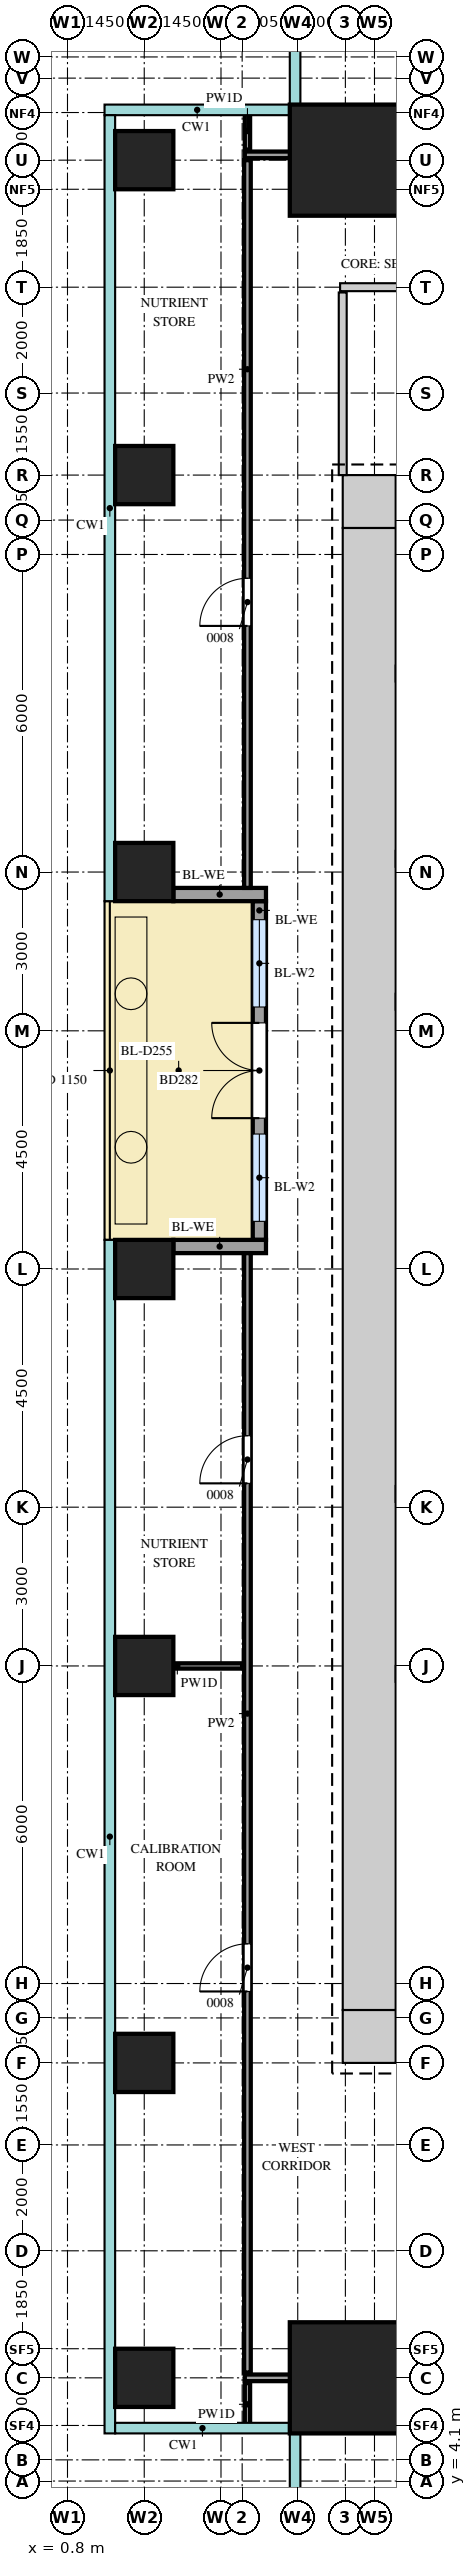
"""IFC4 building model, lengths in metres.
Left out: names, types, materials, properties, quantities, classifications, styles, units other than length and angle.
Written with IfcOpenShell. Run it as: python <this file> out.ifc"""

import sys

from ifc_helpers import new_model, si_unit, direction, frame, frame_2d, origin, origin_2d, place, context, subcontext, project, spatial, rectangle, extrude, source, transform, mapped, element, fill, save


model = new_model("IFC4")
c1 = context("Model", 3, precision=1e-05, world=origin(), true_north=direction((0.0, 1.0)))
c2 = subcontext(c1, "Body", "Model", "MODEL_VIEW")
j1 = project(units=[si_unit("LENGTHUNIT", "METRE"), si_unit("PLANEANGLEUNIT", "RADIAN")], contexts=[c1])
p1 = place(None, origin())
s1 = spatial("IfcSite", under=j1, at=p1, CompositionType="ELEMENT")
p2 = place(p1, origin())
s2 = spatial("IfcBuilding", under=s1, at=p2, CompositionType="ELEMENT")
p3 = place(p2, frame((0.0, 0.0, 132.3)))
s3 = spatial("IfcBuildingStorey", under=s2, at=p3, CompositionType="ELEMENT", Elevation=132.3)
m1 = source(origin(), c2, "Body", "SweptSolid", [
    extrude(rectangle(XDim=1.0, YDim=1.0, at=frame_2d((0.5, 0.0))), origin(), (0.0, 0.0, 1.0), 4.1),
])
for number, where, z_axis, x_axis in (
    (1, (6.0, 41.5, 0.0), (0.0, 0.0, 1.0), (1.0, 0.0, 0.0)),
    (2, (6.0, 12.5, 0.0), (0.0, 0.0, 1.0), (1.0, 0.0, 0.0)),
):
    element("IfcWall", number, at=place(p3, frame(where, z_axis=z_axis, x_axis=x_axis)), inside=s3, PredefinedType="SHEAR", context=c2, shape_type="MappedRepresentation", body=[
        mapped(m1, transform((0.0, 0.0, 0.0))),
    ])
m2 = source(origin(), c2, "Body", "SweptSolid", [
    extrude(rectangle(XDim=28.0, YDim=1.0, at=frame_2d((14.0, 0.0))), origin(), (0.0, 0.0, 1.0), 4.1),
])
p4 = place(p3, frame((6.5, 13.0, 0.0), z_axis=(0.0, 0.0, 1.0), x_axis=(0.0, 1.0, 0.0)))
e3 = element("IfcWall", 3, at=p4, inside=s3, PredefinedType="SHEAR", context=c2, shape_type="MappedRepresentation", body=[
    mapped(m2, transform((0.0, 0.0, 0.0))),
])
m3 = source(origin(), c2, "Body", "SweptSolid", [
    extrude(rectangle(XDim=2.1, YDim=2.1, at=origin_2d()), origin(), (0.0, 0.0, 1.0), 4.4),
])
for number, where, z_axis, x_axis in (
    (4, (6.05, 47.95, 0.0), (0.0, 0.0, 1.0), (1.0, 0.0, 0.0)),
    (5, (6.05, 6.05, 0.0), (0.0, 0.0, 1.0), (1.0, 0.0, 0.0)),
):
    element("IfcColumn", number, at=place(p3, frame(where, z_axis=z_axis, x_axis=x_axis)), inside=s3, PredefinedType="COLUMN", context=c2, shape_type="MappedRepresentation", body=[
        mapped(m3, transform((0.0, 0.0, 0.0))),
    ])
m4 = source(origin(), c2, "Body", "SweptSolid", [
    extrude(rectangle(XDim=1.1, YDim=1.1, at=origin_2d()), origin(), (0.0, 0.0, 1.0), 4.1),
])
for number, where, z_axis, x_axis in (
    (6, (2.25, 6.05, 0.0), (0.0, 0.0, 1.0), (1.0, 0.0, 0.0)),
    (7, (2.25, 12.0, 0.0), (0.0, 0.0, 1.0), (1.0, 0.0, 0.0)),
    (8, (2.25, 19.5, 0.0), (0.0, 0.0, 1.0), (1.0, 0.0, 0.0)),
    (9, (2.25, 27.0, 0.0), (0.0, 0.0, 1.0), (1.0, 0.0, 0.0)),
    (10, (2.25, 34.5, 0.0), (0.0, 0.0, 1.0), (1.0, 0.0, 0.0)),
    (11, (2.25, 42.0, 0.0), (0.0, 0.0, 1.0), (1.0, 0.0, 0.0)),
    (12, (2.25, 47.95, 0.0), (0.0, 0.0, 1.0), (1.0, 0.0, 0.0)),
):
    element("IfcColumn", number, at=place(p3, frame(where, z_axis=z_axis, x_axis=x_axis)), inside=s3, PredefinedType="COLUMN", context=c2, shape_type="MappedRepresentation", body=[
        mapped(m4, transform((0.0, 0.0, 0.0))),
    ])
m5 = source(origin(), c2, "Body", "SweptSolid", [
    extrude(rectangle(XDim=6.4, YDim=0.25, at=frame_2d((3.2, 0.0))), origin(), (0.0, 0.0, 1.0), 3.5),
])
p5 = place(p3, frame((4.425, 27.55, 0.0), z_axis=(0.0, 0.0, 1.0), x_axis=(0.0, 1.0, 0.0)))
e13 = element("IfcWall", 13, at=p5, inside=s3, PredefinedType="SOLIDWALL", context=c2, shape_type="MappedRepresentation", body=[
    mapped(m5, transform((0.0, 0.0, 0.0))),
])
m6 = source(origin(), c2, "Body", "SweptSolid", [
    extrude(rectangle(XDim=1.65, YDim=2.4, at=frame_2d((0.825, 1.2))), frame((0.0, 0.135, 0.0), z_axis=(0.0, -1.0, 0.0), x_axis=(1.0, 0.0, 0.0)), (0.0, 0.0, 1.0), 0.27),
])
p6 = place(p5, frame((0.35, 0.0, 0.0)))
e14 = element("IfcOpeningElement", 14, at=p6, cuts=e13, PredefinedType="OPENING", context=c2, shape_type="MappedRepresentation", body=[
    mapped(m6, transform((0.0, 0.0, 0.0))),
])
p7 = place(p5, frame((4.4, 0.0, 0.0)))
e15 = element("IfcOpeningElement", 15, at=p7, cuts=e13, PredefinedType="OPENING", context=c2, shape_type="MappedRepresentation", body=[
    mapped(m6, transform((0.0, 0.0, 0.0))),
])
m7 = source(origin(), c2, "Body", "SweptSolid", [
    extrude(rectangle(XDim=1.8, YDim=2.4, at=frame_2d((0.9, 1.2))), frame((0.0, 0.135, 0.0), z_axis=(0.0, -1.0, 0.0), x_axis=(1.0, 0.0, 0.0)), (0.0, 0.0, 1.0), 0.27),
])
p8 = place(p5, frame((2.3, 0.0, 0.0)))
e16 = element("IfcOpeningElement", 16, at=p8, cuts=e13, PredefinedType="OPENING", context=c2, shape_type="MappedRepresentation", body=[
    mapped(m7, transform((0.0, 0.0, 0.0))),
])
m8 = source(origin(), c2, "Body", "SweptSolid", [
    extrude(rectangle(XDim=1.75, YDim=0.25, at=frame_2d((0.875, 0.0))), origin(), (0.0, 0.0, 1.0), 3.5),
])
for number, where, z_axis, x_axis in (
    (17, (2.8, 27.425, 0.0), (0.0, 0.0, 1.0), (1.0, 0.0, 0.0)),
    (18, (2.8, 34.075, 0.0), (0.0, 0.0, 1.0), (1.0, 0.0, 0.0)),
):
    element("IfcWall", number, at=place(p3, frame(where, z_axis=z_axis, x_axis=x_axis)), inside=s3, PredefinedType="SOLIDWALL", context=c2, shape_type="MappedRepresentation", body=[
        mapped(m8, transform((0.0, 0.0, 0.0))),
    ])
m9 = source(origin(), c2, "Body", "SweptSolid", [
    extrude(rectangle(XDim=0.8, YDim=0.1, at=frame_2d((0.4, 0.0))), origin(), (0.0, 0.0, 1.0), 4.2),
])
p9 = place(p3, frame((4.2, 5.15, 0.0), z_axis=(0.0, 0.0, 1.0), x_axis=(0.0, 1.0, 0.0)))
e19 = element("IfcWall", 19, at=p9, inside=s3, PredefinedType="PARTITIONING", context=c2, shape_type="MappedRepresentation", body=[
    mapped(m9, transform((0.0, 0.0, 0.0))),
])
m10 = source(origin(), c2, "Body", "SweptSolid", [
    extrude(rectangle(XDim=22.3, YDim=0.125, at=frame_2d((11.15, 0.0))), origin(), (0.0, 0.0, 1.0), 3.55),
])
p10 = place(p3, frame((4.15, 6.05, 0.0), z_axis=(0.0, 0.0, 1.0), x_axis=(1.0, 0.0, 0.0)))
e20 = element("IfcWall", 20, at=p10, inside=s3, PredefinedType="PARTITIONING", context=c2, shape_type="MappedRepresentation", body=[
    mapped(m10, transform((0.0, 0.0, 0.0))),
])
m11 = source(origin(), c2, "Body", "SweptSolid", [
    extrude(rectangle(XDim=0.9, YDim=2.1, at=frame_2d((0.45, 1.05))), frame((0.0, 0.073, 0.0), z_axis=(0.0, -1.0, 0.0), x_axis=(1.0, 0.0, 0.0)), (0.0, 0.0, 1.0), 0.145),
])
p11 = place(p10, frame((10.7, 0.0, 0.0)))
e21 = element("IfcOpeningElement", 21, at=p11, cuts=e20, PredefinedType="OPENING", context=c2, shape_type="MappedRepresentation", body=[
    mapped(m11, transform((0.0, 0.0, 0.0))),
])
m12 = source(origin(), c2, "Body", "SweptSolid", [
    extrude(rectangle(XDim=21.15, YDim=0.125, at=frame_2d((10.575, 0.0))), origin(), (0.0, 0.0, 1.0), 4.2),
])
p12 = place(p3, frame((4.2, 6.15, 0.0), z_axis=(0.0, 0.0, 1.0), x_axis=(0.0, 1.0, 0.0)))
e22 = element("IfcWall", 22, at=p12, inside=s3, PredefinedType="PARTITIONING", context=c2, shape_type="MappedRepresentation", body=[
    mapped(m12, transform((0.0, 0.0, 0.0))),
])
p13 = place(p12, frame((7.2, 0.0, 0.0)))
e23 = element("IfcOpeningElement", 23, at=p13, cuts=e22, PredefinedType="OPENING", context=c2, shape_type="MappedRepresentation", body=[
    mapped(m11, transform((0.0, 0.0, 0.0))),
])
p14 = place(p12, frame((16.8, 0.0, 0.0)))
e24 = element("IfcOpeningElement", 24, at=p14, cuts=e22, PredefinedType="OPENING", context=c2, shape_type="MappedRepresentation", body=[
    mapped(m11, transform((0.0, 0.0, 0.0))),
])
m13 = source(origin(), c2, "Body", "SweptSolid", [
    extrude(rectangle(XDim=2.45, YDim=0.1, at=frame_2d((1.225, 0.0))), origin(), (0.0, 0.0, 1.0), 4.2),
])
p15 = place(p3, frame((1.65, 19.5, 0.0), z_axis=(0.0, 0.0, 1.0), x_axis=(1.0, 0.0, 0.0)))
e25 = element("IfcWall", 25, at=p15, inside=s3, PredefinedType="PARTITIONING", context=c2, shape_type="MappedRepresentation", body=[
    mapped(m13, transform((0.0, 0.0, 0.0))),
])
m14 = source(origin(), c2, "Body", "SweptSolid", [
    extrude(rectangle(XDim=13.75, YDim=0.125, at=frame_2d((6.875, 0.0))), origin(), (0.0, 0.0, 1.0), 4.2),
])
p16 = place(p3, frame((4.2, 34.2, 0.0), z_axis=(0.0, 0.0, 1.0), x_axis=(0.0, 1.0, 0.0)))
e26 = element("IfcWall", 26, at=p16, inside=s3, PredefinedType="PARTITIONING", context=c2, shape_type="MappedRepresentation", body=[
    mapped(m14, transform((0.0, 0.0, 0.0))),
])
p17 = place(p16, frame((4.95, 0.0, 0.0)))
e27 = element("IfcOpeningElement", 27, at=p17, cuts=e26, PredefinedType="OPENING", context=c2, shape_type="MappedRepresentation", body=[
    mapped(m11, transform((0.0, 0.0, 0.0))),
])
m15 = source(origin(), c2, "Body", "SweptSolid", [
    extrude(rectangle(XDim=3.45, YDim=0.15, at=frame_2d((1.725, 0.0))), origin(), (0.0, 0.0, 1.0), 4.2),
])
p18 = place(p3, frame((6.0, 42.0, 0.0), z_axis=(0.0, 0.0, 1.0), x_axis=(0.0, 1.0, 0.0)))
e28 = element("IfcWall", 28, at=p18, inside=s3, PredefinedType="PARTITIONING", context=c2, shape_type="MappedRepresentation", body=[
    mapped(m15, transform((0.0, 0.0, 0.0))),
])
m16 = source(origin(), c2, "Body", "SweptSolid", [
    extrude(rectangle(XDim=7.95, YDim=0.15, at=frame_2d((3.975, 0.0))), origin(), (0.0, 0.0, 1.0), 4.2),
])
p19 = place(p3, frame((5.95, 45.55, 0.0), z_axis=(0.0, 0.0, 1.0), x_axis=(1.0, 0.0, 0.0)))
e29 = element("IfcWall", 29, at=p19, inside=s3, PredefinedType="PARTITIONING", context=c2, shape_type="MappedRepresentation", body=[
    mapped(m16, transform((0.0, 0.0, 0.0))),
])
m17 = source(origin(), c2, "Body", "SweptSolid", [
    extrude(rectangle(XDim=0.9, YDim=2.1, at=frame_2d((0.45, 1.05))), frame((0.0, 0.085, 0.0), z_axis=(0.0, -1.0, 0.0), x_axis=(1.0, 0.0, 0.0)), (0.0, 0.0, 1.0), 0.17),
])
p20 = place(p19, frame((3.55, 0.0, 0.0)))
e30 = element("IfcOpeningElement", 30, at=p20, cuts=e29, PredefinedType="OPENING", context=c2, shape_type="MappedRepresentation", body=[
    mapped(m17, transform((0.0, 0.0, 0.0))),
])
m18 = source(origin(), c2, "Body", "SweptSolid", [
    extrude(rectangle(XDim=42.2, YDim=0.125, at=frame_2d((21.1, 0.0))), origin(), (0.0, 0.0, 1.0), 3.55),
])
p21 = place(p3, frame((4.15, 48.05, 0.0), z_axis=(0.0, 0.0, 1.0), x_axis=(1.0, 0.0, 0.0)))
e31 = element("IfcWall", 31, at=p21, inside=s3, PredefinedType="PARTITIONING", context=c2, shape_type="MappedRepresentation", body=[
    mapped(m18, transform((0.0, 0.0, 0.0))),
])
p22 = place(p21, frame((11.0, 0.0, 0.0)))
e32 = element("IfcOpeningElement", 32, at=p22, cuts=e31, PredefinedType="OPENING", context=c2, shape_type="MappedRepresentation", body=[
    mapped(m11, transform((0.0, 0.0, 0.0))),
])
p23 = place(p21, frame((32.1, 0.0, 0.0)))
e33 = element("IfcOpeningElement", 33, at=p23, cuts=e31, PredefinedType="OPENING", context=c2, shape_type="MappedRepresentation", body=[
    mapped(m11, transform((0.0, 0.0, 0.0))),
])
m19 = source(origin(), c2, "Body", "SweptSolid", [
    extrude(rectangle(XDim=0.7, YDim=0.1, at=frame_2d((0.35, 0.0))), origin(), (0.0, 0.0, 1.0), 4.2),
])
p24 = place(p3, frame((4.2, 48.15, 0.0), z_axis=(0.0, 0.0, 1.0), x_axis=(0.0, 1.0, 0.0)))
e34 = element("IfcWall", 34, at=p24, inside=s3, PredefinedType="PARTITIONING", context=c2, shape_type="MappedRepresentation", body=[
    mapped(m19, transform((0.0, 0.0, 0.0))),
])
m20 = source(origin(), c2, "Body", "SweptSolid", [
    extrude(rectangle(XDim=1.65, YDim=2.4, at=frame_2d((0.825, 1.2))), frame((0.0, 0.03, 0.0), z_axis=(0.0, -1.0, 0.0), x_axis=(1.0, 0.0, 0.0)), (0.0, 0.0, 1.0), 0.06),
])
p25 = place(p6, origin())
e35 = element("IfcWindow", 35, at=p25, inside=s3, PartitioningType="SINGLE_PANEL", PredefinedType="WINDOW", context=c2, shape_type="MappedRepresentation", body=[
    mapped(m20, transform((0.0, 0.0, 0.0))),
])
fill(e14, e35)
p26 = place(p7, origin())
e36 = element("IfcWindow", 36, at=p26, inside=s3, PartitioningType="SINGLE_PANEL", PredefinedType="WINDOW", context=c2, shape_type="MappedRepresentation", body=[
    mapped(m20, transform((0.0, 0.0, 0.0))),
])
fill(e15, e36)
m21 = source(origin(), c2, "Body", "SweptSolid", [
    extrude(rectangle(XDim=1.8, YDim=2.4, at=frame_2d((0.9, 1.2))), frame((0.0, 0.025, 0.0), z_axis=(0.0, -1.0, 0.0), x_axis=(1.0, 0.0, 0.0)), (0.0, 0.0, 1.0), 0.05),
])
p27 = place(p8, origin())
e37 = element("IfcDoor", 37, at=p27, inside=s3, OperationType="DOUBLE_DOOR_DOUBLE_SWING", PredefinedType="DOOR", context=c2, shape_type="MappedRepresentation", body=[
    mapped(m21, transform((0.0, 0.0, 0.0))),
])
fill(e16, e37)
m22 = source(origin(), c2, "Body", "SweptSolid", [
    extrude(rectangle(XDim=0.9, YDim=2.1, at=frame_2d((0.45, 1.05))), frame((0.0, 0.025, 0.0), z_axis=(0.0, -1.0, 0.0), x_axis=(1.0, 0.0, 0.0)), (0.0, 0.0, 1.0), 0.05),
])
p28 = place(p13, origin())
e38 = element("IfcDoor", 38, at=p28, inside=s3, OperationType="SINGLE_SWING_RIGHT", PredefinedType="DOOR", context=c2, shape_type="MappedRepresentation", body=[
    mapped(m22, transform((0.0, 0.0, 0.0))),
])
fill(e23, e38)
p29 = place(p14, origin())
e39 = element("IfcDoor", 39, at=p29, inside=s3, OperationType="SINGLE_SWING_RIGHT", PredefinedType="DOOR", context=c2, shape_type="MappedRepresentation", body=[
    mapped(m22, transform((0.0, 0.0, 0.0))),
])
fill(e24, e39)
p30 = place(p17, origin())
e40 = element("IfcDoor", 40, at=p30, inside=s3, OperationType="SINGLE_SWING_RIGHT", PredefinedType="DOOR", context=c2, shape_type="MappedRepresentation", body=[
    mapped(m22, transform((0.0, 0.0, 0.0))),
])
fill(e27, e40)
save(model, sys.argv[1])
